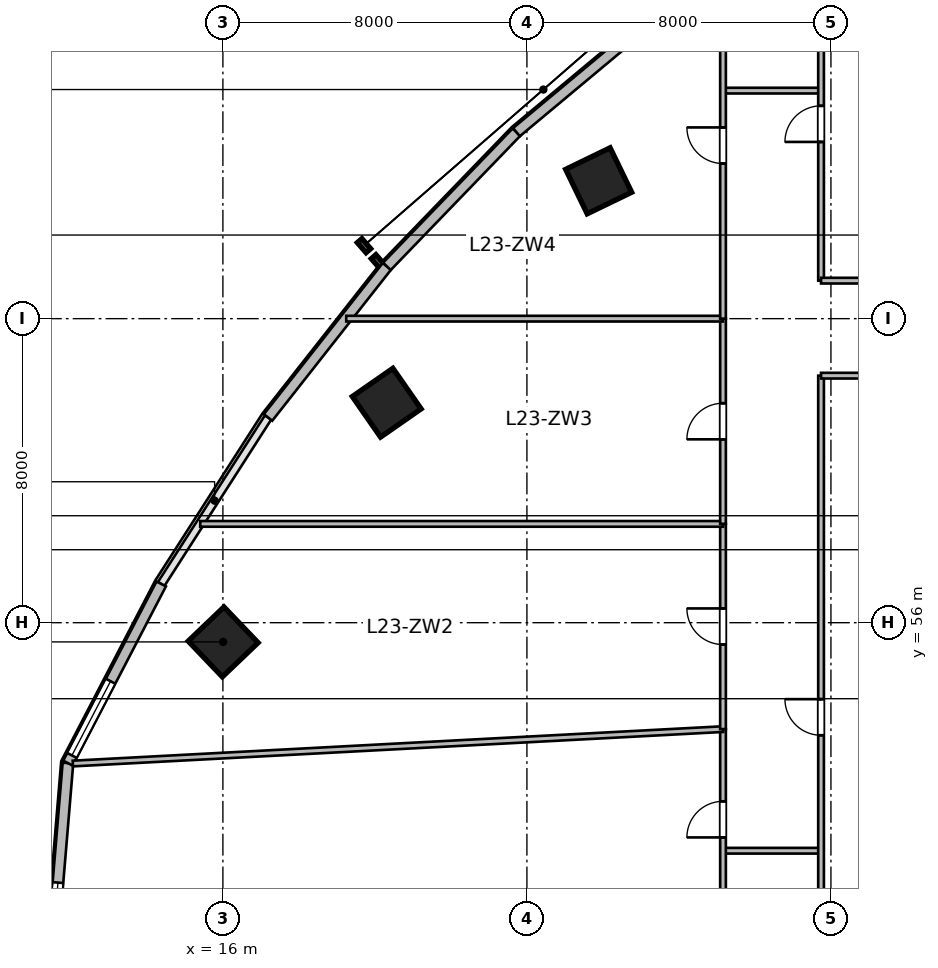
"""IFC4 building model, lengths in metres.
Left out: names, types, materials, properties, quantities, classifications, styles, units other than length and angle.
Written with IfcOpenShell. Run it as: python <this file> out.ifc"""

import sys

from ifc_helpers import new_model, si_unit, direction, frame, frame_2d, origin, origin_2d, place, context, subcontext, project, spatial, rectangle, extrude, source, transform, mapped, element, fill, save


model = new_model("IFC4")
c1 = context("Model", 3, precision=1e-05, world=origin(), true_north=direction((0.0, 1.0)))
c2 = subcontext(c1, "Body", "Model", "MODEL_VIEW")
j1 = project(units=[si_unit("LENGTHUNIT", "METRE"), si_unit("PLANEANGLEUNIT", "RADIAN")], contexts=[c1])
p1 = place(None, origin())
s1 = spatial("IfcSite", under=j1, at=p1, CompositionType="ELEMENT")
p2 = place(p1, origin())
s2 = spatial("IfcBuilding", under=s1, at=p2, CompositionType="ELEMENT")
p3 = place(p2, frame((0.0, 0.0, 99.9)))
s3 = spatial("IfcBuildingStorey", under=s2, at=p3, CompositionType="ELEMENT", Elevation=99.9)
m1 = source(origin(), c2, "Body", "SweptSolid", [
    extrude(rectangle(XDim=1.3, YDim=1.3, at=origin_2d()), origin(), (0.0, 0.0, 1.0), 3.9),
])
for number, where, z_axis, x_axis in (
    (1, (16.007, 55.494, 0.0), (0.0, 0.0, 1.0), (-0.691, 0.723, 0.0)),
    (2, (20.311, 61.789, 0.0), (0.0, 0.0, 1.0), (-0.571, 0.821, 0.0)),
    (3, (25.888, 67.627, 0.0), (0.0, 0.0, 1.0), (-0.436, 0.9, 0.0)),
):
    element("IfcColumn", number, at=place(p3, frame(where, z_axis=z_axis, x_axis=x_axis)), inside=s3, PredefinedType="COLUMN", context=c2, shape_type="MappedRepresentation", body=[
        mapped(m1, transform((0.0, 0.0, 0.0), scale=1.0)),
    ])
m2 = source(origin(), c2, "Body", "SweptSolid", [
    extrude(rectangle(XDim=5.674, YDim=0.28, at=frame_2d((2.837, 0.0))), origin(), (0.0, 0.0, 1.0), 3.65),
])
p4 = place(p3, frame((11.45, 46.652, 0.0), z_axis=(0.0, 0.0, 1.0), x_axis=(0.083309007867, 0.996523762491, 0.0)))
e4 = element("IfcWall", 4, at=p4, inside=s3, PredefinedType="SOLIDWALL", context=c2, shape_type="MappedRepresentation", body=[
    mapped(m2, transform((0.0, 0.0, 0.0), scale=1.0)),
])
p5 = place(p4, frame((0.318, 0.0, 0.95)))
e5 = element("IfcOpeningElement", 5, at=p5, cuts=e4, PredefinedType="OPENING", context=c2, shape_type="SweptSolid", body=[
    extrude(rectangle(XDim=2.2, YDim=2.1, at=frame_2d((1.1, 1.05))), frame((0.0, 0.15, 0.0), z_axis=(0.0, -1.0, 0.0), x_axis=(1.0, 0.0, 0.0)), (0.0, 0.0, 1.0), 0.3),
])
m3 = source(origin(), c2, "Body", "SweptSolid", [
    extrude(rectangle(XDim=5.315, YDim=0.28, at=frame_2d((2.658, 0.0))), origin(), (0.0, 0.0, 1.0), 3.65),
])
p6 = place(p3, frame((11.922, 52.305, 0.0), z_axis=(0.0, 0.0, 1.0), x_axis=(0.461760527822, 0.887004630735, 0.0)))
e6 = element("IfcWall", 6, at=p6, inside=s3, PredefinedType="SOLIDWALL", context=c2, shape_type="MappedRepresentation", body=[
    mapped(m3, transform((0.0, 0.0, 0.0), scale=1.0)),
])
p7 = place(p6, frame((0.229, 0.0, 0.95)))
e7 = element("IfcOpeningElement", 7, at=p7, cuts=e6, PredefinedType="OPENING", context=c2, shape_type="SweptSolid", body=[
    extrude(rectangle(XDim=2.2, YDim=2.1, at=frame_2d((1.1, 1.05))), frame((0.0, 0.15, 0.0), z_axis=(0.0, -1.0, 0.0), x_axis=(1.0, 0.0, 0.0)), (0.0, 0.0, 1.0), 0.3),
])
m4 = source(origin(), c2, "Body", "SweptSolid", [
    extrude(rectangle(XDim=5.058, YDim=0.28, at=frame_2d((2.529, 0.0))), origin(), (0.0, 0.0, 1.0), 3.65),
])
p8 = place(p3, frame((17.188, 61.4, 0.0), z_axis=(0.0, 0.0, 1.0), x_axis=(0.618145507434, 0.786063694391, 0.0)))
e8 = element("IfcWall", 8, at=p8, inside=s3, PredefinedType="SOLIDWALL", context=c2, shape_type="MappedRepresentation", body=[
    mapped(m4, transform((0.0, 0.0, 0.0), scale=1.0)),
])
m5 = source(origin(), c2, "Body", "SweptSolid", [
    extrude(rectangle(XDim=4.908, YDim=0.28, at=frame_2d((2.454, 0.0))), origin(), (0.0, 0.0, 1.0), 3.65),
])
p9 = place(p3, frame((20.315, 65.376, 0.0), z_axis=(0.0, 0.0, 1.0), x_axis=(0.694613154328, 0.719383462302, 0.0)))
e9 = element("IfcWall", 9, at=p9, inside=s3, PredefinedType="SOLIDWALL", context=c2, shape_type="MappedRepresentation", body=[
    mapped(m5, transform((0.0, 0.0, 0.0), scale=1.0)),
])
m6 = source(origin(), c2, "Body", "SweptSolid", [
    extrude(rectangle(XDim=4.762, YDim=0.28, at=frame_2d((2.381, 0.0))), origin(), (0.0, 0.0, 1.0), 3.65),
])
p10 = place(p3, frame((23.725, 68.907, 0.0), z_axis=(0.0, 0.0, 1.0), x_axis=(0.767952279762, 0.640507061638, 0.0)))
e10 = element("IfcWall", 10, at=p10, inside=s3, PredefinedType="SOLIDWALL", context=c2, shape_type="MappedRepresentation", body=[
    mapped(m6, transform((0.0, 0.0, 0.0), scale=1.0)),
])
m7 = source(origin(), c2, "Body", "SweptSolid", [
    extrude(rectangle(XDim=2.5, YDim=0.15, at=frame_2d((1.25, 0.0))), origin(), (0.0, 0.0, 1.0), 3.65),
])
p11 = place(p3, frame((29.2, 50.0, 0.0), z_axis=(0.0, 0.0, 1.0), x_axis=(1.0, 0.0, 0.0)))
e11 = element("IfcWall", 11, at=p11, inside=s3, PredefinedType="PARTITIONING", context=c2, shape_type="MappedRepresentation", body=[
    mapped(m7, transform((0.0, 0.0, 0.0), scale=1.0)),
])
m8 = source(origin(), c2, "Body", "SweptSolid", [
    extrude(rectangle(XDim=2.5, YDim=0.15, at=frame_2d((1.25, 0.0))), origin(), (0.0, 0.0, 1.0), 3.022),
])
p12 = place(p3, frame((29.2, 70.0, 0.0), z_axis=(0.0, 0.0, 1.0), x_axis=(1.0, 0.0, 0.0)))
e12 = element("IfcWall", 12, at=p12, inside=s3, PredefinedType="PARTITIONING", context=c2, shape_type="MappedRepresentation", body=[
    mapped(m8, transform((0.0, 0.0, 0.0), scale=1.0)),
])
m9 = source(origin(), c2, "Body", "SweptSolid", [
    extrude(rectangle(XDim=12.594, YDim=0.15, at=frame_2d((6.297, 0.0))), origin(), (0.0, 0.0, 1.0), 2.942),
])
p13 = place(p3, frame((29.16, 40.606, 0.0), z_axis=(0.0, 0.0, 1.0), x_axis=(0.0, 1.0, 0.0)))
e13 = element("IfcWall", 13, at=p13, inside=s3, PredefinedType="PARTITIONING", context=c2, shape_type="MappedRepresentation", body=[
    mapped(m9, transform((0.0, 0.0, 0.0), scale=1.0)),
])
p14 = place(p13, frame((9.744, 0.0, 0.0)))
e14 = element("IfcOpeningElement", 14, at=p14, cuts=e13, PredefinedType="OPENING", context=c2, shape_type="SweptSolid", body=[
    extrude(rectangle(XDim=0.95, YDim=2.1, at=frame_2d((0.475, 1.05))), frame((0.0, 0.085, 0.0), z_axis=(0.0, -1.0, 0.0), x_axis=(1.0, 0.0, 0.0)), (0.0, 0.0, 1.0), 0.17),
])
m10 = source(origin(), c2, "Body", "SweptSolid", [
    extrude(rectangle(XDim=17.132, YDim=0.15, at=frame_2d((8.566, 0.0))), origin(), (0.0, 0.0, 1.0), 3.65),
])
p15 = place(p3, frame((12.052, 52.294, 0.0), z_axis=(0.0, 0.0, 1.0), x_axis=(0.998601444231, 0.05286923094, 0.0)))
e15 = element("IfcWall", 15, at=p15, inside=s3, PredefinedType="PARTITIONING", context=c2, shape_type="MappedRepresentation", body=[
    mapped(m10, transform((0.0, 0.0, 0.0), scale=1.0)),
])
m11 = source(origin(), c2, "Body", "SweptSolid", [
    extrude(rectangle(XDim=5.4, YDim=0.15, at=frame_2d((2.7, 0.0))), origin(), (0.0, 0.0, 1.0), 3.022),
])
p16 = place(p3, frame((29.16, 53.2, 0.0), z_axis=(0.0, 0.0, 1.0), x_axis=(0.0, 1.0, 0.0)))
e16 = element("IfcWall", 16, at=p16, inside=s3, PredefinedType="PARTITIONING", context=c2, shape_type="MappedRepresentation", body=[
    mapped(m11, transform((0.0, 0.0, 0.0), scale=1.0)),
])
p17 = place(p16, frame((2.225, 0.0, 0.0)))
e17 = element("IfcOpeningElement", 17, at=p17, cuts=e16, PredefinedType="OPENING", context=c2, shape_type="SweptSolid", body=[
    extrude(rectangle(XDim=0.95, YDim=2.1, at=frame_2d((0.475, 1.05))), frame((0.0, 0.085, 0.0), z_axis=(0.0, -1.0, 0.0), x_axis=(1.0, 0.0, 0.0)), (0.0, 0.0, 1.0), 0.17),
])
m12 = source(origin(), c2, "Body", "SweptSolid", [
    extrude(rectangle(XDim=13.757, YDim=0.15, at=frame_2d((6.878, 0.0))), origin(), (0.0, 0.0, 1.0), 3.65),
])
p18 = place(p3, frame((15.403, 58.6, 0.0), z_axis=(0.0, 0.0, 1.0), x_axis=(1.0, 0.0, 0.0)))
e18 = element("IfcWall", 18, at=p18, inside=s3, PredefinedType="PARTITIONING", context=c2, shape_type="MappedRepresentation", body=[
    mapped(m12, transform((0.0, 0.0, 0.0), scale=1.0)),
])
m13 = source(origin(), c2, "Body", "SweptSolid", [
    extrude(rectangle(XDim=5.4, YDim=0.15, at=frame_2d((2.7, 0.0))), origin(), (0.0, 0.0, 1.0), 2.942),
])
p19 = place(p3, frame((29.16, 58.6, 0.0), z_axis=(0.0, 0.0, 1.0), x_axis=(0.0, 1.0, 0.0)))
e19 = element("IfcWall", 19, at=p19, inside=s3, PredefinedType="PARTITIONING", context=c2, shape_type="MappedRepresentation", body=[
    mapped(m13, transform((0.0, 0.0, 0.0), scale=1.0)),
])
p20 = place(p19, frame((2.225, 0.0, 0.0)))
e20 = element("IfcOpeningElement", 20, at=p20, cuts=e19, PredefinedType="OPENING", context=c2, shape_type="SweptSolid", body=[
    extrude(rectangle(XDim=0.95, YDim=2.1, at=frame_2d((0.475, 1.05))), frame((0.0, 0.085, 0.0), z_axis=(0.0, -1.0, 0.0), x_axis=(1.0, 0.0, 0.0)), (0.0, 0.0, 1.0), 0.17),
])
m14 = source(origin(), c2, "Body", "SweptSolid", [
    extrude(rectangle(XDim=9.914, YDim=0.15, at=frame_2d((4.957, 0.0))), origin(), (0.0, 0.0, 1.0), 3.65),
])
p21 = place(p3, frame((19.246, 64.0, 0.0), z_axis=(0.0, 0.0, 1.0), x_axis=(1.0, 0.0, 0.0)))
e21 = element("IfcWall", 21, at=p21, inside=s3, PredefinedType="PARTITIONING", context=c2, shape_type="MappedRepresentation", body=[
    mapped(m14, transform((0.0, 0.0, 0.0), scale=1.0)),
])
m15 = source(origin(), c2, "Body", "SweptSolid", [
    extrude(rectangle(XDim=9.113, YDim=0.15, at=frame_2d((4.557, 0.0))), origin(), (0.0, 0.0, 1.0), 3.65),
])
p22 = place(p3, frame((29.16, 64.0, 0.0), z_axis=(0.0, 0.0, 1.0), x_axis=(0.0, 1.0, 0.0)))
e22 = element("IfcWall", 22, at=p22, inside=s3, PredefinedType="PARTITIONING", context=c2, shape_type="MappedRepresentation", body=[
    mapped(m15, transform((0.0, 0.0, 0.0), scale=1.0)),
])
p23 = place(p22, frame((4.082, 0.0, 0.0)))
e23 = element("IfcOpeningElement", 23, at=p23, cuts=e22, PredefinedType="OPENING", context=c2, shape_type="SweptSolid", body=[
    extrude(rectangle(XDim=0.95, YDim=2.1, at=frame_2d((0.475, 1.05))), frame((0.0, 0.085, 0.0), z_axis=(0.0, -1.0, 0.0), x_axis=(1.0, 0.0, 0.0)), (0.0, 0.0, 1.0), 0.17),
])
m16 = source(origin(), c2, "Body", "SweptSolid", [
    extrude(rectangle(XDim=17.974, YDim=0.15, at=frame_2d((8.987, 0.0))), origin(), (0.0, 0.0, 1.0), 2.942),
])
p24 = place(p3, frame((31.74, 44.526, 0.0), z_axis=(0.0, 0.0, 1.0), x_axis=(0.0, 1.0, 0.0)))
e24 = element("IfcWall", 24, at=p24, inside=s3, PredefinedType="PARTITIONING", context=c2, shape_type="MappedRepresentation", body=[
    mapped(m16, transform((0.0, 0.0, 0.0), scale=1.0)),
])
p25 = place(p24, frame((8.512, 0.0, 0.0)))
e25 = element("IfcOpeningElement", 25, at=p25, cuts=e24, PredefinedType="OPENING", context=c2, shape_type="SweptSolid", body=[
    extrude(rectangle(XDim=0.95, YDim=2.1, at=frame_2d((0.475, 1.05))), frame((0.0, 0.085, 0.0), z_axis=(0.0, -1.0, 0.0), x_axis=(1.0, 0.0, 0.0)), (0.0, 0.0, 1.0), 0.17),
])
m17 = source(origin(), c2, "Body", "SweptSolid", [
    extrude(rectangle(XDim=2.66, YDim=0.15, at=frame_2d((1.33, 0.0))), origin(), (0.0, 0.0, 1.0), 3.65),
])
p26 = place(p3, frame((31.74, 62.5, 0.0), z_axis=(0.0, 0.0, 1.0), x_axis=(1.0, 0.0, 0.0)))
e26 = element("IfcWall", 26, at=p26, inside=s3, PredefinedType="PARTITIONING", context=c2, shape_type="MappedRepresentation", body=[
    mapped(m17, transform((0.0, 0.0, 0.0), scale=1.0)),
])
m18 = source(origin(), c2, "Body", "SweptSolid", [
    extrude(rectangle(XDim=9.729, YDim=0.15, at=frame_2d((4.864, 0.0))), origin(), (0.0, 0.0, 1.0), 3.65),
])
p27 = place(p3, frame((31.74, 65.0, 0.0), z_axis=(0.0, 0.0, 1.0), x_axis=(0.0, 1.0, 0.0)))
e27 = element("IfcWall", 27, at=p27, inside=s3, PredefinedType="PARTITIONING", context=c2, shape_type="MappedRepresentation", body=[
    mapped(m18, transform((0.0, 0.0, 0.0), scale=1.0)),
])
p28 = place(p27, frame((3.65, 0.0, 0.0)))
e28 = element("IfcOpeningElement", 28, at=p28, cuts=e27, PredefinedType="OPENING", context=c2, shape_type="SweptSolid", body=[
    extrude(rectangle(XDim=0.95, YDim=2.1, at=frame_2d((0.475, 1.05))), frame((0.0, 0.085, 0.0), z_axis=(0.0, -1.0, 0.0), x_axis=(1.0, 0.0, 0.0)), (0.0, 0.0, 1.0), 0.17),
])
p29 = place(p3, frame((31.74, 65.0, 0.0), z_axis=(0.0, 0.0, 1.0), x_axis=(1.0, 0.0, 0.0)))
e29 = element("IfcWall", 29, at=p29, inside=s3, PredefinedType="PARTITIONING", context=c2, shape_type="MappedRepresentation", body=[
    mapped(m17, transform((0.0, 0.0, 0.0), scale=1.0)),
])
m19 = source(origin(), c2, "Body", "SweptSolid", [
    extrude(rectangle(XDim=2.2, YDim=2.1, at=frame_2d((1.1, 1.05))), frame((0.0, 0.03, 0.0), z_axis=(0.0, -1.0, 0.0), x_axis=(1.0, 0.0, 0.0)), (0.0, 0.0, 1.0), 0.06),
])
p30 = place(p5, origin())
e30 = element("IfcWindow", 30, at=p30, inside=s3, PartitioningType="TRIPLE_PANEL_VERTICAL", PredefinedType="WINDOW", context=c2, shape_type="MappedRepresentation", body=[
    mapped(m19, transform((0.0, 0.0, 0.0), scale=1.0)),
])
fill(e5, e30)
p31 = place(p7, origin())
e31 = element("IfcWindow", 31, at=p31, inside=s3, PartitioningType="TRIPLE_PANEL_VERTICAL", PredefinedType="WINDOW", context=c2, shape_type="MappedRepresentation", body=[
    mapped(m19, transform((0.0, 0.0, 0.0), scale=1.0)),
])
fill(e7, e31)
m20 = source(origin(), c2, "Body", "SweptSolid", [
    extrude(rectangle(XDim=0.95, YDim=2.1, at=frame_2d((0.475, 1.05))), frame((0.0, 0.025, 0.0), z_axis=(0.0, -1.0, 0.0), x_axis=(1.0, 0.0, 0.0)), (0.0, 0.0, 1.0), 0.05),
])
p32 = place(p14, origin())
e32 = element("IfcDoor", 32, at=p32, inside=s3, OperationType="SINGLE_SWING_LEFT", PredefinedType="DOOR", context=c2, shape_type="MappedRepresentation", body=[
    mapped(m20, transform((0.0, 0.0, 0.0), scale=1.0)),
])
fill(e14, e32)
p33 = place(p17, origin())
e33 = element("IfcDoor", 33, at=p33, inside=s3, OperationType="SINGLE_SWING_RIGHT", PredefinedType="DOOR", context=c2, shape_type="MappedRepresentation", body=[
    mapped(m20, transform((0.0, 0.0, 0.0), scale=1.0)),
])
fill(e17, e33)
p34 = place(p20, origin())
e34 = element("IfcDoor", 34, at=p34, inside=s3, OperationType="SINGLE_SWING_LEFT", PredefinedType="DOOR", context=c2, shape_type="MappedRepresentation", body=[
    mapped(m20, transform((0.0, 0.0, 0.0), scale=1.0)),
])
fill(e20, e34)
p35 = place(p23, origin())
e35 = element("IfcDoor", 35, at=p35, inside=s3, OperationType="SINGLE_SWING_RIGHT", PredefinedType="DOOR", context=c2, shape_type="MappedRepresentation", body=[
    mapped(m20, transform((0.0, 0.0, 0.0), scale=1.0)),
])
fill(e23, e35)
p36 = place(p25, origin())
e36 = element("IfcDoor", 36, at=p36, inside=s3, OperationType="SINGLE_SWING_RIGHT", PredefinedType="DOOR", context=c2, shape_type="MappedRepresentation", body=[
    mapped(m20, transform((0.0, 0.0, 0.0), scale=1.0)),
])
fill(e25, e36)
p37 = place(p28, origin())
e37 = element("IfcDoor", 37, at=p37, inside=s3, OperationType="SINGLE_SWING_LEFT", PredefinedType="DOOR", context=c2, shape_type="MappedRepresentation", body=[
    mapped(m20, transform((0.0, 0.0, 0.0), scale=1.0)),
])
fill(e28, e37)
save(model, sys.argv[1])
